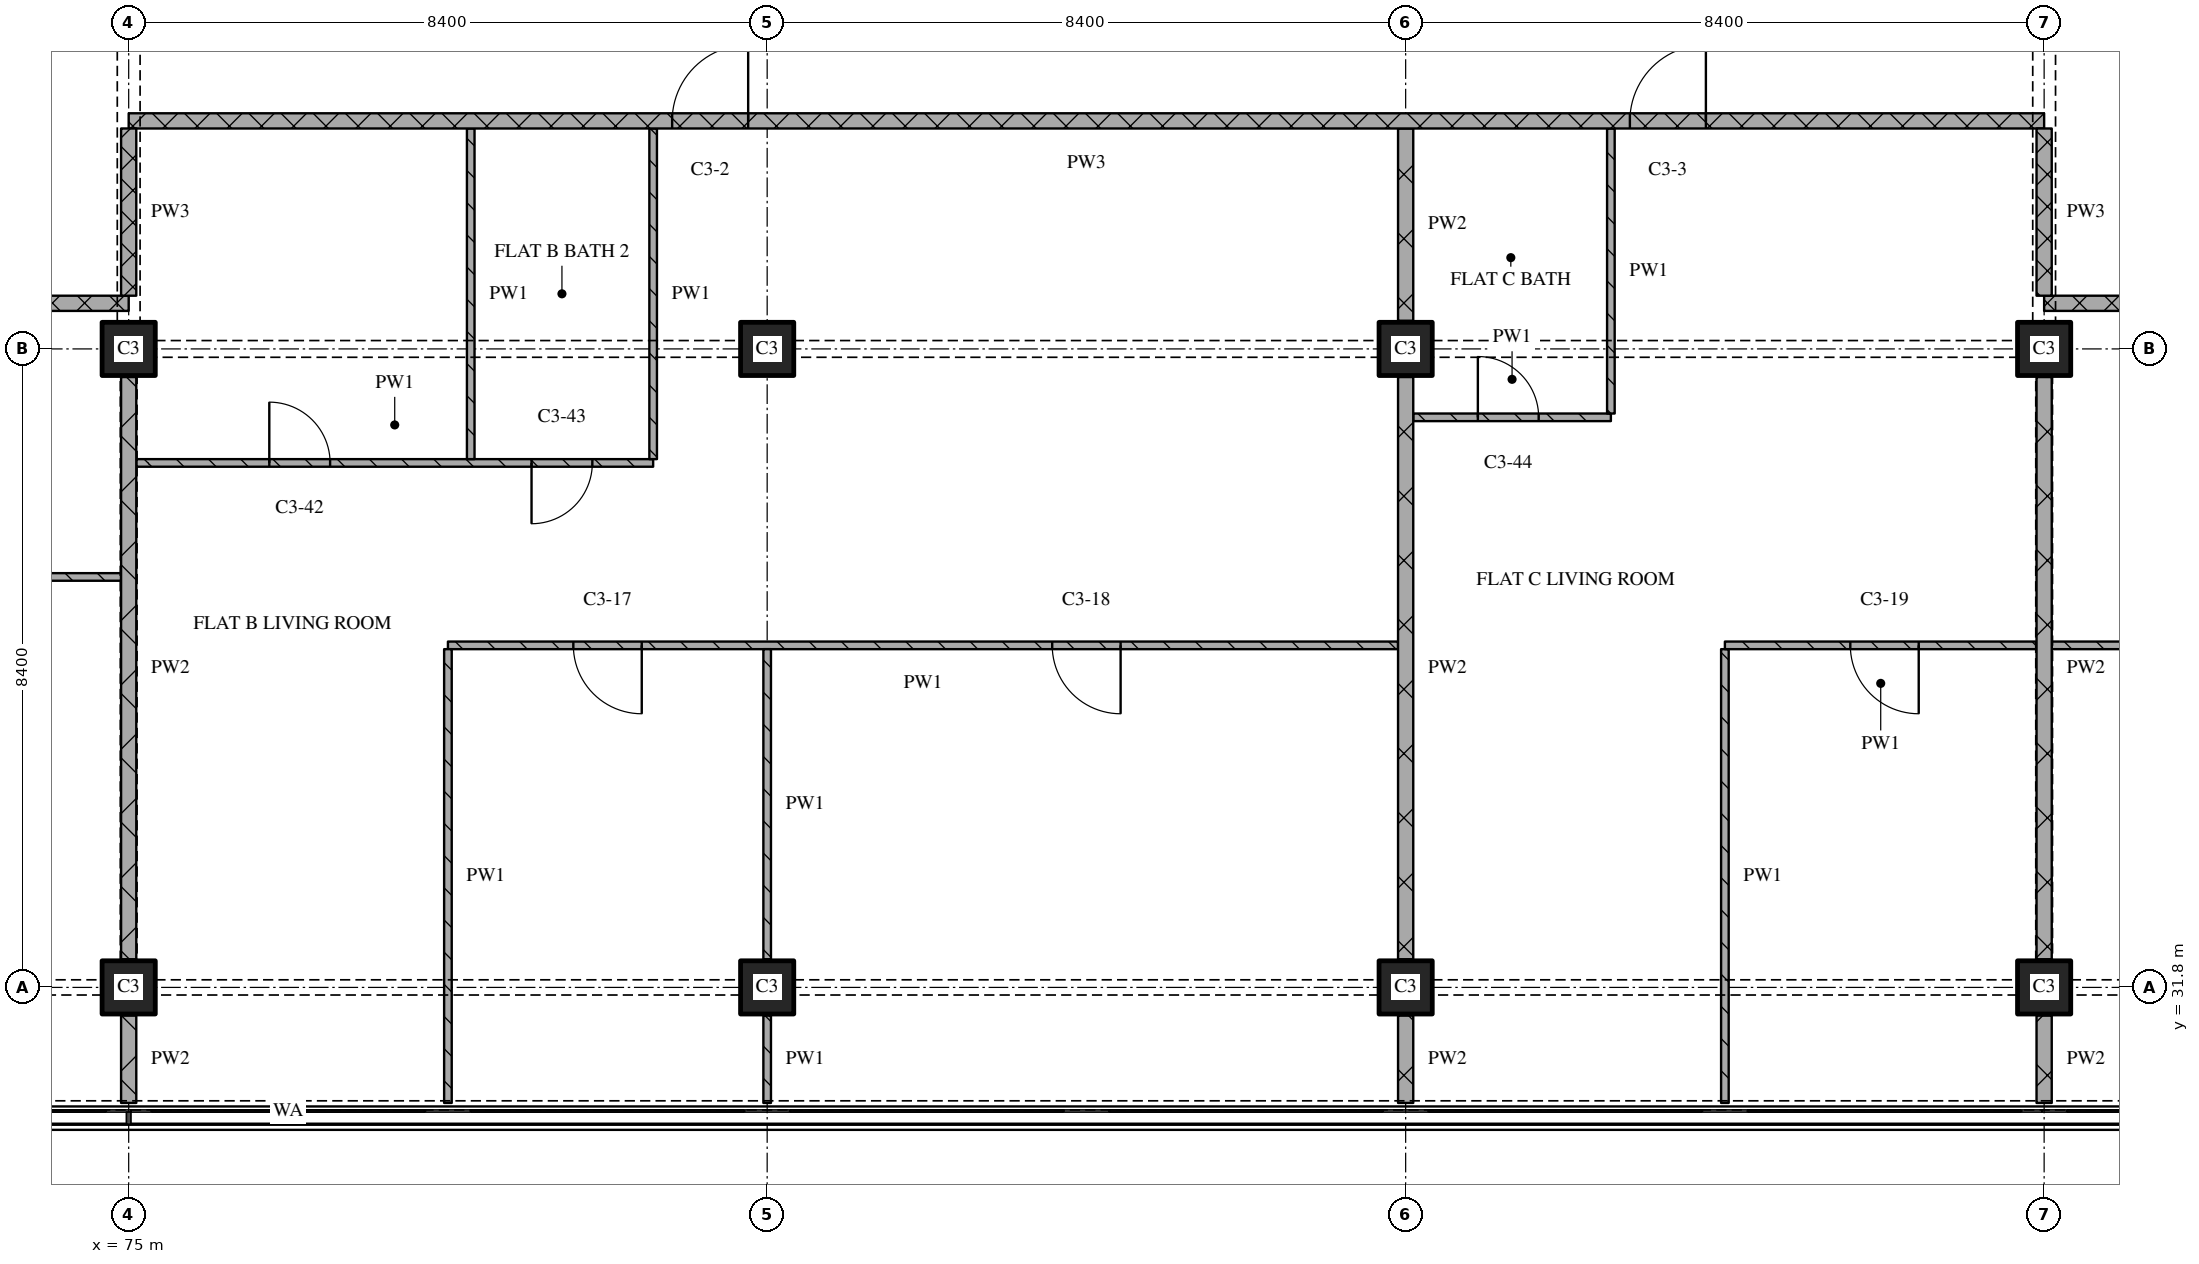
"""IFC4 building model, lengths in metres.
Left out: names, types, materials, properties, quantities, classifications, styles, units other than length and angle.
Written with IfcOpenShell. Run it as: python <this file> out.ifc"""

import sys

from ifc_helpers import new_model, si_unit, direction, frame, frame_2d, origin, origin_2d, place, context, subcontext, project, spatial, rectangle, extrude, element, fill, save


model = new_model("IFC4")
c1 = context("Model", 3, precision=1e-05, world=origin(), true_north=direction((0.0, 1.0)))
c2 = subcontext(c1, "Body", "Model", "MODEL_VIEW")
j1 = project(units=[si_unit("LENGTHUNIT", "METRE"), si_unit("PLANEANGLEUNIT", "RADIAN")], contexts=[c1])
p1 = place(None, origin())
s1 = spatial("IfcSite", under=j1, at=p1, CompositionType="ELEMENT")
p2 = place(p1, origin())
s2 = spatial("IfcBuilding", under=s1, at=p2, CompositionType="ELEMENT")
p3 = place(p2, frame((0.0, 0.0, 172.65)))
s3 = spatial("IfcBuildingStorey", under=s2, at=p3, CompositionType="ELEMENT", Elevation=172.65)
for number, where, z_axis, x_axis in (
    (1, (75.0, 31.8, 0.0), (0.0, 0.0, 1.0), (1.0, 0.0, 0.0)),
    (2, (75.0, 40.2, 0.0), (0.0, 0.0, 1.0), (1.0, 0.0, 0.0)),
    (3, (83.4, 31.8, 0.0), (0.0, 0.0, 1.0), (1.0, 0.0, 0.0)),
    (4, (83.4, 40.2, 0.0), (0.0, 0.0, 1.0), (1.0, 0.0, 0.0)),
    (5, (91.8, 31.8, 0.0), (0.0, 0.0, 1.0), (1.0, 0.0, 0.0)),
    (6, (91.8, 40.2, 0.0), (0.0, 0.0, 1.0), (1.0, 0.0, 0.0)),
    (7, (100.2, 31.8, 0.0), (0.0, 0.0, 1.0), (1.0, 0.0, 0.0)),
    (8, (100.2, 40.2, 0.0), (0.0, 0.0, 1.0), (1.0, 0.0, 0.0)),
):
    element("IfcColumn", number, at=place(p3, frame(where, z_axis=z_axis, x_axis=x_axis)), inside=s3, PredefinedType="COLUMN", context=c2, shape_type="SweptSolid", body=[
        extrude(rectangle(XDim=0.7, YDim=0.7, at=origin_2d()), origin(), (0.0, 0.0, 1.0), 3.6),
    ])
p4 = place(p3, frame((91.7, 36.3, 0.0), z_axis=(0.0, 0.0, 1.0), x_axis=(-1.0, 0.0, 0.0)))
e9 = element("IfcWall", 9, at=p4, inside=s3, PredefinedType="PARTITIONING", context=c2, shape_type="SweptSolid", body=[
    extrude(rectangle(XDim=12.5, YDim=0.1, at=frame_2d((6.25, 0.0))), origin(), (0.0, 0.0, 1.0), 3.32),
])
p5 = place(p4, frame((3.65, 0.0, 0.0)))
e10 = element("IfcOpeningElement", 10, at=p5, cuts=e9, PredefinedType="OPENING", context=c2, shape_type="SweptSolid", body=[
    extrude(rectangle(XDim=0.9, YDim=2.1, at=frame_2d((0.45, 1.05))), frame((0.0, 0.06, 0.0), z_axis=(0.0, -1.0, 0.0), x_axis=(1.0, 0.0, 0.0)), (0.0, 0.0, 1.0), 0.12),
])
p6 = place(p4, frame((9.95, 0.0, 0.0)))
e11 = element("IfcOpeningElement", 11, at=p6, cuts=e9, PredefinedType="OPENING", context=c2, shape_type="SweptSolid", body=[
    extrude(rectangle(XDim=0.9, YDim=2.1, at=frame_2d((0.45, 1.05))), frame((0.0, 0.06, 0.0), z_axis=(0.0, -1.0, 0.0), x_axis=(1.0, 0.0, 0.0)), (0.0, 0.0, 1.0), 0.12),
])
p7 = place(p3, frame((63.0, 37.2, 0.0), z_axis=(0.0, 0.0, 1.0), x_axis=(1.0, 0.0, 0.0)))
e12 = element("IfcWall", 12, at=p7, inside=s3, PredefinedType="PARTITIONING", context=c2, shape_type="SweptSolid", body=[
    extrude(rectangle(XDim=11.9, YDim=0.1, at=frame_2d((5.95, 0.0))), origin(), (0.0, 0.0, 1.0), 3.32),
])
p8 = place(p7, frame((6.35, 0.0, 0.0)))
e13 = element("IfcOpeningElement", 13, at=p8, cuts=e12, PredefinedType="OPENING", context=c2, shape_type="SweptSolid", body=[
    extrude(rectangle(XDim=0.8, YDim=2.1, at=frame_2d((0.4, 1.05))), frame((0.0, 0.06, 0.0), z_axis=(0.0, -1.0, 0.0), x_axis=(1.0, 0.0, 0.0)), (0.0, 0.0, 1.0), 0.12),
])
p9 = place(p7, frame((10.05, 0.0, 0.0)))
e14 = element("IfcOpeningElement", 14, at=p9, cuts=e12, PredefinedType="OPENING", context=c2, shape_type="SweptSolid", body=[
    extrude(rectangle(XDim=0.9, YDim=2.1, at=frame_2d((0.45, 1.05))), frame((0.0, 0.06, 0.0), z_axis=(0.0, -1.0, 0.0), x_axis=(1.0, 0.0, 0.0)), (0.0, 0.0, 1.0), 0.12),
])
p10 = place(p3, frame((75.1, 38.7, 0.0), z_axis=(0.0, 0.0, 1.0), x_axis=(1.0, 0.0, 0.0)))
e15 = element("IfcWall", 15, at=p10, inside=s3, PredefinedType="PARTITIONING", context=c2, shape_type="SweptSolid", body=[
    extrude(rectangle(XDim=6.8, YDim=0.1, at=frame_2d((3.4, 0.0))), origin(), (0.0, 0.0, 1.0), 3.32),
])
p11 = place(p10, frame((1.75, 0.0, 0.0)))
e16 = element("IfcOpeningElement", 16, at=p11, cuts=e15, PredefinedType="OPENING", context=c2, shape_type="SweptSolid", body=[
    extrude(rectangle(XDim=0.8, YDim=2.1, at=frame_2d((0.4, 1.05))), frame((0.0, 0.06, 0.0), z_axis=(0.0, -1.0, 0.0), x_axis=(1.0, 0.0, 0.0)), (0.0, 0.0, 1.0), 0.12),
])
p12 = place(p10, frame((5.2, 0.0, 0.0)))
e17 = element("IfcOpeningElement", 17, at=p12, cuts=e15, PredefinedType="OPENING", context=c2, shape_type="SweptSolid", body=[
    extrude(rectangle(XDim=0.8, YDim=2.1, at=frame_2d((0.4, 1.05))), frame((0.0, 0.06, 0.0), z_axis=(0.0, -1.0, 0.0), x_axis=(1.0, 0.0, 0.0)), (0.0, 0.0, 1.0), 0.12),
])
p13 = place(p3, frame((91.9, 39.3, 0.0), z_axis=(0.0, 0.0, 1.0), x_axis=(1.0, 0.0, 0.0)))
e18 = element("IfcWall", 18, at=p13, inside=s3, PredefinedType="PARTITIONING", context=c2, shape_type="SweptSolid", body=[
    extrude(rectangle(XDim=2.6, YDim=0.1, at=frame_2d((1.3, 0.0))), origin(), (0.0, 0.0, 1.0), 3.32),
])
p14 = place(p13, frame((0.85, 0.0, 0.0)))
e19 = element("IfcOpeningElement", 19, at=p14, cuts=e18, PredefinedType="OPENING", context=c2, shape_type="SweptSolid", body=[
    extrude(rectangle(XDim=0.8, YDim=2.1, at=frame_2d((0.4, 1.05))), frame((0.0, 0.06, 0.0), z_axis=(0.0, -1.0, 0.0), x_axis=(1.0, 0.0, 0.0)), (0.0, 0.0, 1.0), 0.12),
])
p15 = place(p3, frame((75.0, 40.8, 0.0), z_axis=(0.0, 0.0, 1.0), x_axis=(-1.0, 0.0, 0.0)))
e20 = element("IfcWall", 20, at=p15, inside=s3, PredefinedType="PARTITIONING", context=c2, shape_type="SweptSolid", body=[
    extrude(rectangle(XDim=24.28, YDim=0.2, at=frame_2d((12.14, 0.0))), origin(), (0.0, 0.0, 1.0), 3.32),
])
p16 = place(p15, frame((12.25, 0.0, 0.0)))
e21 = element("IfcOpeningElement", 21, at=p16, cuts=e20, PredefinedType="OPENING", context=c2, shape_type="SweptSolid", body=[
    extrude(rectangle(XDim=1.0, YDim=2.1, at=frame_2d((0.5, 1.05))), frame((0.0, 0.11, 0.0), z_axis=(0.0, -1.0, 0.0), x_axis=(1.0, 0.0, 0.0)), (0.0, 0.0, 1.0), 0.22),
])
p17 = place(p3, frame((124.48, 40.8, 0.0), z_axis=(0.0, 0.0, 1.0), x_axis=(-1.0, 0.0, 0.0)))
e22 = element("IfcWall", 22, at=p17, inside=s3, PredefinedType="PARTITIONING", context=c2, shape_type="SweptSolid", body=[
    extrude(rectangle(XDim=24.28, YDim=0.2, at=frame_2d((12.14, 0.0))), origin(), (0.0, 0.0, 1.0), 3.32),
])
p18 = place(p17, frame((11.93, 0.0, 0.0)))
e23 = element("IfcOpeningElement", 23, at=p18, cuts=e22, PredefinedType="OPENING", context=c2, shape_type="SweptSolid", body=[
    extrude(rectangle(XDim=1.0, YDim=2.1, at=frame_2d((0.5, 1.05))), frame((0.0, 0.11, 0.0), z_axis=(0.0, -1.0, 0.0), x_axis=(1.0, 0.0, 0.0)), (0.0, 0.0, 1.0), 0.22),
])
p19 = place(p3, frame((100.2, 43.2, 0.0), z_axis=(0.0, 0.0, 1.0), x_axis=(-1.0, 0.0, 0.0)))
e24 = element("IfcWall", 24, at=p19, inside=s3, PredefinedType="PARTITIONING", context=c2, shape_type="SweptSolid", body=[
    extrude(rectangle(XDim=25.2, YDim=0.2, at=frame_2d((12.6, 0.0))), origin(), (0.0, 0.0, 1.0), 3.32),
])
p20 = place(p19, frame((4.45, 0.0, 0.0)))
e25 = element("IfcOpeningElement", 25, at=p20, cuts=e24, PredefinedType="OPENING", context=c2, shape_type="SweptSolid", body=[
    extrude(rectangle(XDim=1.0, YDim=2.1, at=frame_2d((0.5, 1.05))), frame((0.0, 0.11, 0.0), z_axis=(0.0, -1.0, 0.0), x_axis=(1.0, 0.0, 0.0)), (0.0, 0.0, 1.0), 0.22),
])
p21 = place(p19, frame((17.05, 0.0, 0.0)))
e26 = element("IfcOpeningElement", 26, at=p21, cuts=e24, PredefinedType="OPENING", context=c2, shape_type="SweptSolid", body=[
    extrude(rectangle(XDim=1.0, YDim=2.1, at=frame_2d((0.5, 1.05))), frame((0.0, 0.11, 0.0), z_axis=(0.0, -1.0, 0.0), x_axis=(1.0, 0.0, 0.0)), (0.0, 0.0, 1.0), 0.22),
])
p22 = place(p3, frame((75.0, 43.1, 0.0), z_axis=(0.0, 0.0, 1.0), x_axis=(0.0, -1.0, 0.0)))
e27 = element("IfcWall", 27, at=p22, inside=s3, PredefinedType="PARTITIONING", context=c2, shape_type="SweptSolid", body=[
    extrude(rectangle(XDim=2.2, YDim=0.2, at=frame_2d((1.1, 0.0))), origin(), (0.0, 0.0, 1.0), 2.43),
])
p23 = place(p3, frame((75.0, 31.43, 0.0), z_axis=(0.0, 0.0, 1.0), x_axis=(0.0, -1.0, 0.0)))
e28 = element("IfcWall", 28, at=p23, inside=s3, PredefinedType="PARTITIONING", context=c2, shape_type="SweptSolid", body=[
    extrude(rectangle(XDim=1.15, YDim=0.2, at=frame_2d((0.575, 0.0))), origin(), (0.0, 0.0, 1.0), 3.32),
])
p24 = place(p3, frame((75.0, 39.83, 0.0), z_axis=(0.0, 0.0, 1.0), x_axis=(0.0, -1.0, 0.0)))
e29 = element("IfcWall", 29, at=p24, inside=s3, PredefinedType="PARTITIONING", context=c2, shape_type="SweptSolid", body=[
    extrude(rectangle(XDim=7.66, YDim=0.2, at=frame_2d((3.83, 0.0))), origin(), (0.0, 0.0, 1.0), 2.72),
])
p25 = place(p3, frame((79.2, 36.25, 0.0), z_axis=(0.0, 0.0, 1.0), x_axis=(0.0, -1.0, 0.0)))
e30 = element("IfcWall", 30, at=p25, inside=s3, PredefinedType="PARTITIONING", context=c2, shape_type="SweptSolid", body=[
    extrude(rectangle(XDim=5.97, YDim=0.1, at=frame_2d((2.985, 0.0))), origin(), (0.0, 0.0, 1.0), 3.32),
])
for number, where, z_axis, x_axis in (
    (31, (79.5, 43.1, 0.0), (0.0, 0.0, 1.0), (0.0, -1.0, 0.0)),
    (32, (81.9, 43.1, 0.0), (0.0, 0.0, 1.0), (0.0, -1.0, 0.0)),
):
    element("IfcWall", number, at=place(p3, frame(where, z_axis=z_axis, x_axis=x_axis)), inside=s3, PredefinedType="PARTITIONING", context=c2, shape_type="SweptSolid", body=[
        extrude(rectangle(XDim=4.35, YDim=0.1, at=frame_2d((2.175, 0.0))), origin(), (0.0, 0.0, 1.0), 3.32),
    ])
p26 = place(p3, frame((83.4, 31.43, 0.0), z_axis=(0.0, 0.0, 1.0), x_axis=(0.0, -1.0, 0.0)))
e33 = element("IfcWall", 33, at=p26, inside=s3, PredefinedType="PARTITIONING", context=c2, shape_type="SweptSolid", body=[
    extrude(rectangle(XDim=1.15, YDim=0.1, at=frame_2d((0.575, 0.0))), origin(), (0.0, 0.0, 1.0), 3.32),
])
p27 = place(p3, frame((83.4, 36.25, 0.0), z_axis=(0.0, 0.0, 1.0), x_axis=(0.0, -1.0, 0.0)))
e34 = element("IfcWall", 34, at=p27, inside=s3, PredefinedType="PARTITIONING", context=c2, shape_type="SweptSolid", body=[
    extrude(rectangle(XDim=4.08, YDim=0.1, at=frame_2d((2.04, 0.0))), origin(), (0.0, 0.0, 1.0), 3.32),
])
p28 = place(p3, frame((91.8, 31.43, 0.0), z_axis=(0.0, 0.0, 1.0), x_axis=(0.0, -1.0, 0.0)))
e35 = element("IfcWall", 35, at=p28, inside=s3, PredefinedType="PARTITIONING", context=c2, shape_type="SweptSolid", body=[
    extrude(rectangle(XDim=1.15, YDim=0.2, at=frame_2d((0.575, 0.0))), origin(), (0.0, 0.0, 1.0), 3.32),
])
p29 = place(p3, frame((91.8, 39.83, 0.0), z_axis=(0.0, 0.0, 1.0), x_axis=(0.0, -1.0, 0.0)))
e36 = element("IfcWall", 36, at=p29, inside=s3, PredefinedType="PARTITIONING", context=c2, shape_type="SweptSolid", body=[
    extrude(rectangle(XDim=7.66, YDim=0.2, at=frame_2d((3.83, 0.0))), origin(), (0.0, 0.0, 1.0), 3.32),
])
p30 = place(p3, frame((91.8, 43.1, 0.0), z_axis=(0.0, 0.0, 1.0), x_axis=(0.0, -1.0, 0.0)))
e37 = element("IfcWall", 37, at=p30, inside=s3, PredefinedType="PARTITIONING", context=c2, shape_type="SweptSolid", body=[
    extrude(rectangle(XDim=2.53, YDim=0.2, at=frame_2d((1.265, 0.0))), origin(), (0.0, 0.0, 1.0), 3.32),
])
p31 = place(p3, frame((94.5, 43.1, 0.0), z_axis=(0.0, 0.0, 1.0), x_axis=(0.0, -1.0, 0.0)))
e38 = element("IfcWall", 38, at=p31, inside=s3, PredefinedType="PARTITIONING", context=c2, shape_type="SweptSolid", body=[
    extrude(rectangle(XDim=3.75, YDim=0.1, at=frame_2d((1.875, 0.0))), origin(), (0.0, 0.0, 1.0), 3.32),
])
p32 = place(p3, frame((96.0, 36.25, 0.0), z_axis=(0.0, 0.0, 1.0), x_axis=(0.0, -1.0, 0.0)))
e39 = element("IfcWall", 39, at=p32, inside=s3, PredefinedType="PARTITIONING", context=c2, shape_type="SweptSolid", body=[
    extrude(rectangle(XDim=5.97, YDim=0.1, at=frame_2d((2.985, 0.0))), origin(), (0.0, 0.0, 1.0), 3.32),
])
p33 = place(p3, frame((100.2, 43.1, 0.0), z_axis=(0.0, 0.0, 1.0), x_axis=(0.0, -1.0, 0.0)))
e40 = element("IfcWall", 40, at=p33, inside=s3, PredefinedType="PARTITIONING", context=c2, shape_type="SweptSolid", body=[
    extrude(rectangle(XDim=2.2, YDim=0.2, at=frame_2d((1.1, 0.0))), origin(), (0.0, 0.0, 1.0), 2.43),
])
p34 = place(p3, frame((100.2, 31.43, 0.0), z_axis=(0.0, 0.0, 1.0), x_axis=(0.0, -1.0, 0.0)))
e41 = element("IfcWall", 41, at=p34, inside=s3, PredefinedType="PARTITIONING", context=c2, shape_type="SweptSolid", body=[
    extrude(rectangle(XDim=1.15, YDim=0.2, at=frame_2d((0.575, 0.0))), origin(), (0.0, 0.0, 1.0), 3.32),
])
p35 = place(p3, frame((100.2, 39.83, 0.0), z_axis=(0.0, 0.0, 1.0), x_axis=(0.0, -1.0, 0.0)))
e42 = element("IfcWall", 42, at=p35, inside=s3, PredefinedType="PARTITIONING", context=c2, shape_type="SweptSolid", body=[
    extrude(rectangle(XDim=7.66, YDim=0.2, at=frame_2d((3.83, 0.0))), origin(), (0.0, 0.0, 1.0), 2.72),
])
p36 = place(p3, frame((100.1, 36.3, 0.0), z_axis=(0.0, 0.0, 1.0), x_axis=(-1.0, 0.0, 0.0)))
e43 = element("IfcWall", 43, at=p36, inside=s3, PredefinedType="PARTITIONING", context=c2, shape_type="SweptSolid", body=[
    extrude(rectangle(XDim=4.1, YDim=0.1, at=frame_2d((2.05, 0.0))), origin(), (0.0, 0.0, 1.0), 3.32),
])
p37 = place(p36, frame((1.55, 0.0, 0.0)))
e44 = element("IfcOpeningElement", 44, at=p37, cuts=e43, PredefinedType="OPENING", context=c2, shape_type="SweptSolid", body=[
    extrude(rectangle(XDim=0.9, YDim=2.1, at=frame_2d((0.45, 1.05))), frame((0.0, 0.06, 0.0), z_axis=(0.0, -1.0, 0.0), x_axis=(1.0, 0.0, 0.0)), (0.0, 0.0, 1.0), 0.12),
])
p38 = place(p3, frame((100.3, 36.3, 0.0), z_axis=(0.0, 0.0, 1.0), x_axis=(1.0, 0.0, 0.0)))
e45 = element("IfcWall", 45, at=p38, inside=s3, PredefinedType="PARTITIONING", context=c2, shape_type="SweptSolid", body=[
    extrude(rectangle(XDim=11.0, YDim=0.1, at=frame_2d((5.5, 0.0))), origin(), (0.0, 0.0, 1.0), 3.32),
])
p39 = place(p38, frame((1.75, 0.0, 0.0)))
e46 = element("IfcOpeningElement", 46, at=p39, cuts=e45, PredefinedType="OPENING", context=c2, shape_type="SweptSolid", body=[
    extrude(rectangle(XDim=0.8, YDim=2.1, at=frame_2d((0.4, 1.05))), frame((0.0, 0.06, 0.0), z_axis=(0.0, -1.0, 0.0), x_axis=(1.0, 0.0, 0.0)), (0.0, 0.0, 1.0), 0.12),
])
p40 = place(p38, frame((6.25, 0.0, 0.0)))
e47 = element("IfcOpeningElement", 47, at=p40, cuts=e45, PredefinedType="OPENING", context=c2, shape_type="SweptSolid", body=[
    extrude(rectangle(XDim=0.8, YDim=2.1, at=frame_2d((0.4, 1.05))), frame((0.0, 0.06, 0.0), z_axis=(0.0, -1.0, 0.0), x_axis=(1.0, 0.0, 0.0)), (0.0, 0.0, 1.0), 0.12),
])
p41 = place(p38, frame((9.5, 0.0, 0.0)))
e48 = element("IfcOpeningElement", 48, at=p41, cuts=e45, PredefinedType="OPENING", context=c2, shape_type="SweptSolid", body=[
    extrude(rectangle(XDim=0.9, YDim=2.1, at=frame_2d((0.45, 1.05))), frame((0.0, 0.06, 0.0), z_axis=(0.0, -1.0, 0.0), x_axis=(1.0, 0.0, 0.0)), (0.0, 0.0, 1.0), 0.12),
])
p42 = place(p5, origin())
e49 = element("IfcDoor", 49, at=p42, inside=s3, OperationType="SINGLE_SWING_LEFT", PredefinedType="DOOR", context=c2, shape_type="SweptSolid", body=[
    extrude(rectangle(XDim=0.9, YDim=2.1, at=frame_2d((0.45, 1.05))), frame((0.0, 0.025, 0.0), z_axis=(0.0, -1.0, 0.0), x_axis=(1.0, 0.0, 0.0)), (0.0, 0.0, 1.0), 0.05),
])
fill(e10, e49)
p43 = place(p6, origin())
e50 = element("IfcDoor", 50, at=p43, inside=s3, OperationType="SINGLE_SWING_LEFT", PredefinedType="DOOR", context=c2, shape_type="SweptSolid", body=[
    extrude(rectangle(XDim=0.9, YDim=2.1, at=frame_2d((0.45, 1.05))), frame((0.0, 0.025, 0.0), z_axis=(0.0, -1.0, 0.0), x_axis=(1.0, 0.0, 0.0)), (0.0, 0.0, 1.0), 0.05),
])
fill(e11, e50)
p44 = place(p11, origin())
e51 = element("IfcDoor", 51, at=p44, inside=s3, OperationType="SINGLE_SWING_LEFT", PredefinedType="DOOR", context=c2, shape_type="SweptSolid", body=[
    extrude(rectangle(XDim=0.8, YDim=2.1, at=frame_2d((0.4, 1.05))), frame((0.0, 0.025, 0.0), z_axis=(0.0, -1.0, 0.0), x_axis=(1.0, 0.0, 0.0)), (0.0, 0.0, 1.0), 0.05),
])
fill(e16, e51)
p45 = place(p12, origin())
e52 = element("IfcDoor", 52, at=p45, inside=s3, OperationType="SINGLE_SWING_RIGHT", PredefinedType="DOOR", context=c2, shape_type="SweptSolid", body=[
    extrude(rectangle(XDim=0.8, YDim=2.1, at=frame_2d((0.4, 1.05))), frame((0.0, 0.025, 0.0), z_axis=(0.0, -1.0, 0.0), x_axis=(1.0, 0.0, 0.0)), (0.0, 0.0, 1.0), 0.05),
])
fill(e17, e52)
p46 = place(p14, origin())
e53 = element("IfcDoor", 53, at=p46, inside=s3, OperationType="SINGLE_SWING_LEFT", PredefinedType="DOOR", context=c2, shape_type="SweptSolid", body=[
    extrude(rectangle(XDim=0.8, YDim=2.1, at=frame_2d((0.4, 1.05))), frame((0.0, 0.025, 0.0), z_axis=(0.0, -1.0, 0.0), x_axis=(1.0, 0.0, 0.0)), (0.0, 0.0, 1.0), 0.05),
])
fill(e19, e53)
p47 = place(p20, origin())
e54 = element("IfcDoor", 54, at=p47, inside=s3, OperationType="SINGLE_SWING_RIGHT", PredefinedType="DOOR", context=c2, shape_type="SweptSolid", body=[
    extrude(rectangle(XDim=1.0, YDim=2.1, at=frame_2d((0.5, 1.05))), frame((0.0, 0.025, 0.0), z_axis=(0.0, -1.0, 0.0), x_axis=(1.0, 0.0, 0.0)), (0.0, 0.0, 1.0), 0.05),
])
fill(e25, e54)
p48 = place(p21, origin())
e55 = element("IfcDoor", 55, at=p48, inside=s3, OperationType="SINGLE_SWING_RIGHT", PredefinedType="DOOR", context=c2, shape_type="SweptSolid", body=[
    extrude(rectangle(XDim=1.0, YDim=2.1, at=frame_2d((0.5, 1.05))), frame((0.0, 0.025, 0.0), z_axis=(0.0, -1.0, 0.0), x_axis=(1.0, 0.0, 0.0)), (0.0, 0.0, 1.0), 0.05),
])
fill(e26, e55)
p49 = place(p37, origin())
e56 = element("IfcDoor", 56, at=p49, inside=s3, OperationType="SINGLE_SWING_LEFT", PredefinedType="DOOR", context=c2, shape_type="SweptSolid", body=[
    extrude(rectangle(XDim=0.9, YDim=2.1, at=frame_2d((0.45, 1.05))), frame((0.0, 0.025, 0.0), z_axis=(0.0, -1.0, 0.0), x_axis=(1.0, 0.0, 0.0)), (0.0, 0.0, 1.0), 0.05),
])
fill(e44, e56)
save(model, sys.argv[1])
